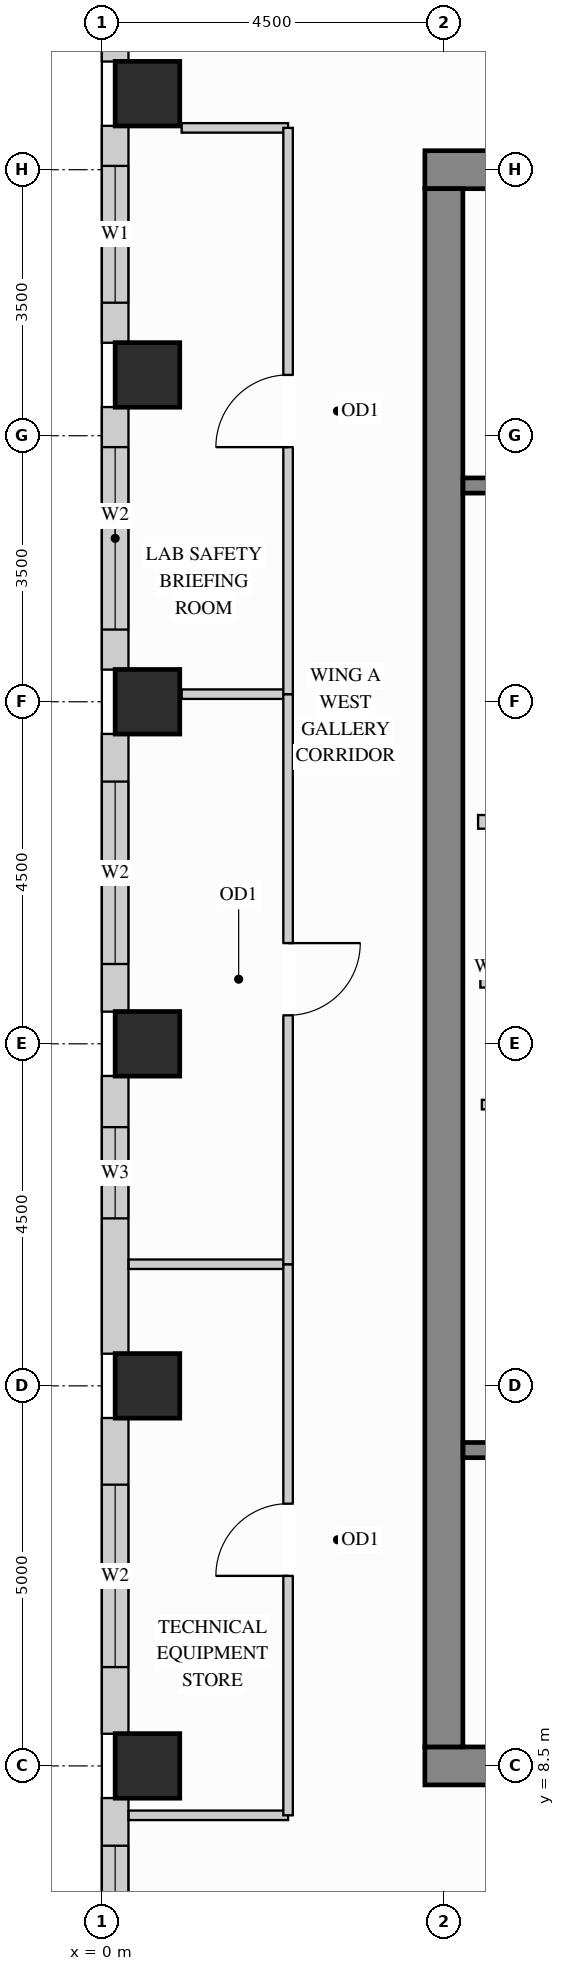
"""IFC4 building model, lengths in metres.
Left out: names, types, materials, properties, quantities, classifications, styles, units other than length and angle.
Written with IfcOpenShell. Run it as: python <this file> out.ifc"""

import sys

from ifc_helpers import new_model, si_unit, direction, frame, frame_2d, origin, origin_2d, place, context, subcontext, project, spatial, rectangle, extrude, source, transform, mapped, element, fill, save


model = new_model("IFC4")
c1 = context("Model", 3, precision=1e-05, world=origin(), true_north=direction((0.0, 1.0)))
c2 = subcontext(c1, "Body", "Model", "MODEL_VIEW")
j1 = project(units=[si_unit("LENGTHUNIT", "METRE"), si_unit("PLANEANGLEUNIT", "RADIAN")], contexts=[c1])
p1 = place(None, origin())
s1 = spatial("IfcSite", under=j1, at=p1, CompositionType="ELEMENT")
p2 = place(p1, origin())
s2 = spatial("IfcBuilding", under=s1, at=p2, CompositionType="ELEMENT")
p3 = place(p2, frame((0.0, 0.0, 230.4)))
s3 = spatial("IfcBuildingStorey", under=s2, at=p3, CompositionType="ELEMENT", Elevation=230.4)
m1 = source(origin(), c2, "Body", "SweptSolid", [
    extrude(rectangle(XDim=0.85, YDim=0.85, at=origin_2d()), origin(), (0.0, 0.0, 1.0), 3.4),
])
for number, where, z_axis, x_axis in (
    (1, (0.6, 13.5, 0.0), (0.0, 0.0, 1.0), (1.0, 0.0, 0.0)),
    (2, (0.6, 18.0, 0.0), (0.0, 0.0, 1.0), (1.0, 0.0, 0.0)),
    (3, (0.6, 22.5, 0.0), (0.0, 0.0, 1.0), (1.0, 0.0, 0.0)),
    (4, (0.6, 26.8, 0.0), (0.0, 0.0, 1.0), (1.0, 0.0, 0.0)),
    (5, (0.6, 30.5, 0.0), (0.0, 0.0, 1.0), (1.0, 0.0, 0.0)),
    (6, (0.6, 8.5, 0.0), (0.0, 0.0, 1.0), (1.0, 0.0, 0.0)),
):
    element("IfcColumn", number, at=place(p3, frame(where, z_axis=z_axis, x_axis=x_axis)), inside=s3, PredefinedType="COLUMN", context=c2, shape_type="MappedRepresentation", body=[
        mapped(m1, transform((0.0, 0.0, 0.0), x_axis=(1.0, 0.0, 0.0), y_axis=(0.0, 1.0, 0.0), z_axis=(0.0, 0.0, 1.0))),
    ])
m2 = source(origin(), c2, "Body", "SweptSolid", [
    extrude(rectangle(XDim=10.5, YDim=0.5, at=frame_2d((5.25, 0.0))), origin(), (0.0, 0.0, 1.0), 3.4),
])
for number, where, z_axis, x_axis in (
    (7, (4.25, 29.5, 0.0), (0.0, 0.0, 1.0), (1.0, 0.0, 0.0)),
    (8, (4.25, 8.5, 0.0), (0.0, 0.0, 1.0), (1.0, 0.0, 0.0)),
):
    element("IfcWall", number, at=place(p3, frame(where, z_axis=z_axis, x_axis=x_axis)), inside=s3, PredefinedType="SHEAR", context=c2, shape_type="MappedRepresentation", body=[
        mapped(m2, transform((0.0, 0.0, 0.0), x_axis=(1.0, 0.0, 0.0), y_axis=(0.0, 1.0, 0.0), z_axis=(0.0, 0.0, 1.0))),
    ])
m3 = source(origin(), c2, "Body", "SweptSolid", [
    extrude(rectangle(XDim=20.5, YDim=0.5, at=frame_2d((10.25, 0.0))), origin(), (0.0, 0.0, 1.0), 3.4),
])
p4 = place(p3, frame((4.5, 8.75, 0.0), z_axis=(0.0, 0.0, 1.0), x_axis=(0.0, 1.0, 0.0)))
e9 = element("IfcWall", 9, at=p4, inside=s3, PredefinedType="SHEAR", context=c2, shape_type="MappedRepresentation", body=[
    mapped(m3, transform((0.0, 0.0, 0.0), x_axis=(1.0, 0.0, 0.0), y_axis=(0.0, 1.0, 0.0), z_axis=(0.0, 0.0, 1.0))),
])
p5 = place(p3, frame((0.175, 34.577, 0.0), z_axis=(0.0, 0.0, 1.0), x_axis=(0.0, -1.0, 0.0)))
e10 = element("IfcWall", 10, at=p5, inside=s3, PredefinedType="SOLIDWALL", context=c2, shape_type="SweptSolid", body=[
    extrude(rectangle(XDim=3.654, YDim=0.35, at=frame_2d((1.827, 0.0))), origin(), (0.0, 0.0, 1.0), 3.385),
])
p6 = place(p5, frame((2.055, 0.0, 0.78)))
e11 = element("IfcOpeningElement", 11, at=p6, cuts=e10, PredefinedType="OPENING", context=c2, shape_type="SweptSolid", body=[
    extrude(rectangle(XDim=1.2, YDim=2.1, at=frame_2d((0.6, 1.05))), frame((0.0, 0.185, 0.0), z_axis=(0.0, -1.0, 0.0), x_axis=(1.0, 0.0, 0.0)), (0.0, 0.0, 1.0), 0.37),
])
p7 = place(p3, frame((0.175, 30.077, 0.0), z_axis=(0.0, 0.0, 1.0), x_axis=(0.0, -1.0, 0.0)))
e12 = element("IfcWall", 12, at=p7, inside=s3, PredefinedType="SOLIDWALL", context=c2, shape_type="SweptSolid", body=[
    extrude(rectangle(XDim=2.854, YDim=0.35, at=frame_2d((1.427, 0.0))), origin(), (0.0, 0.0, 1.0), 3.385),
])
p8 = place(p7, frame((0.527, 0.0, 0.78)))
e13 = element("IfcOpeningElement", 13, at=p8, cuts=e12, PredefinedType="OPENING", context=c2, shape_type="SweptSolid", body=[
    extrude(rectangle(XDim=1.8, YDim=2.1, at=frame_2d((0.9, 1.05))), frame((0.0, 0.185, 0.0), z_axis=(0.0, -1.0, 0.0), x_axis=(1.0, 0.0, 0.0)), (0.0, 0.0, 1.0), 0.37),
])
p9 = place(p3, frame((0.175, 26.377, 0.0), z_axis=(0.0, 0.0, 1.0), x_axis=(0.0, -1.0, 0.0)))
e14 = element("IfcWall", 14, at=p9, inside=s3, PredefinedType="SOLIDWALL", context=c2, shape_type="SweptSolid", body=[
    extrude(rectangle(XDim=3.454, YDim=0.35, at=frame_2d((1.727, 0.0))), origin(), (0.0, 0.0, 1.0), 3.385),
])
p10 = place(p9, frame((0.527, 0.0, 0.78)))
e15 = element("IfcOpeningElement", 15, at=p10, cuts=e14, PredefinedType="OPENING", context=c2, shape_type="SweptSolid", body=[
    extrude(rectangle(XDim=2.4, YDim=2.1, at=frame_2d((1.2, 1.05))), frame((0.0, 0.185, 0.0), z_axis=(0.0, -1.0, 0.0), x_axis=(1.0, 0.0, 0.0)), (0.0, 0.0, 1.0), 0.37),
])
p11 = place(p3, frame((0.175, 22.077, 0.0), z_axis=(0.0, 0.0, 1.0), x_axis=(0.0, -1.0, 0.0)))
e16 = element("IfcWall", 16, at=p11, inside=s3, PredefinedType="SOLIDWALL", context=c2, shape_type="SweptSolid", body=[
    extrude(rectangle(XDim=3.654, YDim=0.35, at=frame_2d((1.827, 0.0))), origin(), (0.0, 0.0, 1.0), 3.385),
])
p12 = place(p11, frame((0.627, 0.0, 0.78)))
e17 = element("IfcOpeningElement", 17, at=p12, cuts=e16, PredefinedType="OPENING", context=c2, shape_type="SweptSolid", body=[
    extrude(rectangle(XDim=2.4, YDim=2.1, at=frame_2d((1.2, 1.05))), frame((0.0, 0.185, 0.0), z_axis=(0.0, -1.0, 0.0), x_axis=(1.0, 0.0, 0.0)), (0.0, 0.0, 1.0), 0.37),
])
p13 = place(p3, frame((0.175, 17.577, 0.0), z_axis=(0.0, 0.0, 1.0), x_axis=(0.0, -1.0, 0.0)))
e18 = element("IfcWall", 18, at=p13, inside=s3, PredefinedType="SOLIDWALL", context=c2, shape_type="SweptSolid", body=[
    extrude(rectangle(XDim=3.654, YDim=0.35, at=frame_2d((1.827, 0.0))), origin(), (0.0, 0.0, 1.0), 3.385),
])
p14 = place(p13, frame((0.674, 0.0, 0.78)))
e19 = element("IfcOpeningElement", 19, at=p14, cuts=e18, PredefinedType="OPENING", context=c2, shape_type="SweptSolid", body=[
    extrude(rectangle(XDim=1.2, YDim=2.1, at=frame_2d((0.6, 1.05))), frame((0.0, 0.185, 0.0), z_axis=(0.0, -1.0, 0.0), x_axis=(1.0, 0.0, 0.0)), (0.0, 0.0, 1.0), 0.37),
])
p15 = place(p3, frame((0.175, 13.077, 0.0), z_axis=(0.0, 0.0, 1.0), x_axis=(0.0, -1.0, 0.0)))
e20 = element("IfcWall", 20, at=p15, inside=s3, PredefinedType="SOLIDWALL", context=c2, shape_type="SweptSolid", body=[
    extrude(rectangle(XDim=4.154, YDim=0.35, at=frame_2d((2.077, 0.0))), origin(), (0.0, 0.0, 1.0), 3.385),
])
p16 = place(p15, frame((0.877, 0.0, 0.78)))
e21 = element("IfcOpeningElement", 21, at=p16, cuts=e20, PredefinedType="OPENING", context=c2, shape_type="SweptSolid", body=[
    extrude(rectangle(XDim=2.4, YDim=2.1, at=frame_2d((1.2, 1.05))), frame((0.0, 0.185, 0.0), z_axis=(0.0, -1.0, 0.0), x_axis=(1.0, 0.0, 0.0)), (0.0, 0.0, 1.0), 0.37),
])
p17 = place(p3, frame((0.175, 8.077, 0.0), z_axis=(0.0, 0.0, 1.0), x_axis=(0.0, -1.0, 0.0)))
e22 = element("IfcWall", 22, at=p17, inside=s3, PredefinedType="SOLIDWALL", context=c2, shape_type="SweptSolid", body=[
    extrude(rectangle(XDim=4.154, YDim=0.35, at=frame_2d((2.077, 0.0))), origin(), (0.0, 0.0, 1.0), 3.385),
])
p18 = place(p17, frame((0.627, 0.0, 0.78)))
e23 = element("IfcOpeningElement", 23, at=p18, cuts=e22, PredefinedType="OPENING", context=c2, shape_type="SweptSolid", body=[
    extrude(rectangle(XDim=2.4, YDim=2.1, at=frame_2d((1.2, 1.05))), frame((0.0, 0.185, 0.0), z_axis=(0.0, -1.0, 0.0), x_axis=(1.0, 0.0, 0.0)), (0.0, 0.0, 1.0), 0.37),
])
m4 = source(origin(), c2, "Body", "SweptSolid", [
    extrude(rectangle(XDim=2.2, YDim=0.18, at=frame_2d((1.1, 0.0))), origin(), (0.0, 0.0, 1.0), 3.385),
])
p19 = place(p3, frame((4.95, 20.92, 0.0), z_axis=(0.0, 0.0, 1.0), x_axis=(1.0, 0.0, 0.0)))
e24 = element("IfcWall", 24, at=p19, inside=s3, PredefinedType="PARTITIONING", context=c2, shape_type="MappedRepresentation", body=[
    mapped(m4, transform((0.0, 0.0, 0.0), x_axis=(1.0, 0.0, 0.0), y_axis=(0.0, 1.0, 0.0), z_axis=(0.0, 0.0, 1.0))),
])
p20 = place(p3, frame((5.0, 17.2, 0.0), z_axis=(0.0, 0.0, 1.0), x_axis=(1.0, 0.0, 0.0)))
e25 = element("IfcWall", 25, at=p20, inside=s3, PredefinedType="PARTITIONING", context=c2, shape_type="SweptSolid", body=[
    extrude(rectangle(XDim=2.4, YDim=0.125, at=frame_2d((1.2, 0.0))), origin(), (0.0, 0.0, 1.0), 3.385),
])
p21 = place(p20, frame((0.7, 0.0, 0.0)))
e26 = element("IfcOpeningElement", 26, at=p21, cuts=e25, PredefinedType="OPENING", context=c2, shape_type="SweptSolid", body=[
    extrude(rectangle(XDim=0.85, YDim=2.1, at=frame_2d((0.425, 1.05))), frame((0.0, 0.073, 0.0), z_axis=(0.0, -1.0, 0.0), x_axis=(1.0, 0.0, 0.0)), (0.0, 0.0, 1.0), 0.145),
])
m5 = source(origin(), c2, "Body", "SweptSolid", [
    extrude(rectangle(XDim=1.4, YDim=0.125, at=frame_2d((0.7, 0.0))), origin(), (0.0, 0.0, 1.0), 3.385),
])
p22 = place(p3, frame((1.05, 30.05, 0.0), z_axis=(0.0, 0.0, 1.0), x_axis=(1.0, 0.0, 0.0)))
e27 = element("IfcWall", 27, at=p22, inside=s3, PredefinedType="PARTITIONING", context=c2, shape_type="MappedRepresentation", body=[
    mapped(m5, transform((0.0, 0.0, 0.0), x_axis=(1.0, 0.0, 0.0), y_axis=(0.0, 1.0, 0.0), z_axis=(0.0, 0.0, 1.0))),
])
m6 = source(origin(), c2, "Body", "SweptSolid", [
    extrude(rectangle(XDim=2.098, YDim=0.125, at=frame_2d((1.049, 0.0))), origin(), (0.0, 0.0, 1.0), 3.385),
])
for number, where, z_axis, x_axis in (
    (28, (0.352, 7.85, 0.0), (0.0, 0.0, 1.0), (1.0, 0.0, 0.0)),
    (29, (0.352, 15.1, 0.0), (0.0, 0.0, 1.0), (1.0, 0.0, 0.0)),
):
    element("IfcWall", number, at=place(p3, frame(where, z_axis=z_axis, x_axis=x_axis)), inside=s3, PredefinedType="PARTITIONING", context=c2, shape_type="MappedRepresentation", body=[
        mapped(m6, transform((0.0, 0.0, 0.0), x_axis=(1.0, 0.0, 0.0), y_axis=(0.0, 1.0, 0.0), z_axis=(0.0, 0.0, 1.0))),
    ])
p23 = place(p3, frame((1.05, 22.6, 0.0), z_axis=(0.0, 0.0, 1.0), x_axis=(1.0, 0.0, 0.0)))
e30 = element("IfcWall", 30, at=p23, inside=s3, PredefinedType="PARTITIONING", context=c2, shape_type="MappedRepresentation", body=[
    mapped(m5, transform((0.0, 0.0, 0.0), x_axis=(1.0, 0.0, 0.0), y_axis=(0.0, 1.0, 0.0), z_axis=(0.0, 0.0, 1.0))),
])
p24 = place(p3, frame((2.45, 7.85, 0.0), z_axis=(0.0, 0.0, 1.0), x_axis=(0.0, 1.0, 0.0)))
e31 = element("IfcWall", 31, at=p24, inside=s3, PredefinedType="PARTITIONING", context=c2, shape_type="SweptSolid", body=[
    extrude(rectangle(XDim=7.25, YDim=0.125, at=frame_2d((3.625, 0.0))), origin(), (0.0, 0.0, 1.0), 3.385),
])
p25 = place(p24, frame((3.15, 0.0, 0.0)))
e32 = element("IfcOpeningElement", 32, at=p25, cuts=e31, PredefinedType="OPENING", context=c2, shape_type="SweptSolid", body=[
    extrude(rectangle(XDim=0.95, YDim=2.15, at=frame_2d((0.475, 1.075))), frame((0.0, 0.073, 0.0), z_axis=(0.0, -1.0, 0.0), x_axis=(1.0, 0.0, 0.0)), (0.0, 0.0, 1.0), 0.145),
])
p26 = place(p3, frame((2.45, 15.1, 0.0), z_axis=(0.0, 0.0, 1.0), x_axis=(0.0, 1.0, 0.0)))
e33 = element("IfcWall", 33, at=p26, inside=s3, PredefinedType="PARTITIONING", context=c2, shape_type="SweptSolid", body=[
    extrude(rectangle(XDim=7.5, YDim=0.125, at=frame_2d((3.75, 0.0))), origin(), (0.0, 0.0, 1.0), 3.385),
])
p27 = place(p26, frame((3.275, 0.0, 0.0)))
e34 = element("IfcOpeningElement", 34, at=p27, cuts=e33, PredefinedType="OPENING", context=c2, shape_type="SweptSolid", body=[
    extrude(rectangle(XDim=0.95, YDim=2.15, at=frame_2d((0.475, 1.075))), frame((0.0, 0.073, 0.0), z_axis=(0.0, -1.0, 0.0), x_axis=(1.0, 0.0, 0.0)), (0.0, 0.0, 1.0), 0.145),
])
p28 = place(p3, frame((2.45, 22.6, 0.0), z_axis=(0.0, 0.0, 1.0), x_axis=(0.0, 1.0, 0.0)))
e35 = element("IfcWall", 35, at=p28, inside=s3, PredefinedType="PARTITIONING", context=c2, shape_type="SweptSolid", body=[
    extrude(rectangle(XDim=7.45, YDim=0.125, at=frame_2d((3.725, 0.0))), origin(), (0.0, 0.0, 1.0), 3.385),
])
p29 = place(p28, frame((3.25, 0.0, 0.0)))
e36 = element("IfcOpeningElement", 36, at=p29, cuts=e35, PredefinedType="OPENING", context=c2, shape_type="SweptSolid", body=[
    extrude(rectangle(XDim=0.95, YDim=2.15, at=frame_2d((0.475, 1.075))), frame((0.0, 0.073, 0.0), z_axis=(0.0, -1.0, 0.0), x_axis=(1.0, 0.0, 0.0)), (0.0, 0.0, 1.0), 0.145),
])
m7 = source(origin(), c2, "Body", "SweptSolid", [
    extrude(rectangle(XDim=2.09, YDim=0.2, at=frame_2d((1.045, 0.0))), origin(), (0.0, 0.0, 1.0), 3.385),
])
p30 = place(p3, frame((4.98, 18.84, 0.0), z_axis=(0.0, 0.0, 1.0), x_axis=(1.0, 0.0, 0.0)))
e37 = element("IfcWall", 37, at=p30, inside=s3, PredefinedType="PARTITIONING", context=c2, shape_type="MappedRepresentation", body=[
    mapped(m7, transform((0.0, 0.0, 0.0), x_axis=(1.0, 0.0, 0.0), y_axis=(0.0, 1.0, 0.0), z_axis=(0.0, 0.0, 1.0))),
])
p31 = place(p3, frame((4.752, 12.655, 0.0), z_axis=(0.0, 0.0, 1.0), x_axis=(1.0, 0.0, 0.0)))
e38 = element("IfcWall", 38, at=p31, inside=s3, PredefinedType="SHEAR", context=c2, shape_type="SweptSolid", body=[
    extrude(rectangle(XDim=7.653, YDim=0.2, at=frame_2d((3.827, 0.0))), origin(), (0.0, 0.0, 1.0), 3.4),
])
p32 = place(p31, frame((0.4, 0.0, 0.0)))
e39 = element("IfcOpeningElement", 39, at=p32, cuts=e38, PredefinedType="OPENING", context=c2, shape_type="SweptSolid", body=[
    extrude(rectangle(XDim=1.1, YDim=2.15, at=frame_2d((0.55, 1.075))), frame((0.0, 0.11, 0.0), z_axis=(0.0, -1.0, 0.0), x_axis=(1.0, 0.0, 0.0)), (0.0, 0.0, 1.0), 0.22),
])
p33 = place(p3, frame((4.752, 25.345, 0.0), z_axis=(0.0, 0.0, 1.0), x_axis=(1.0, 0.0, 0.0)))
e40 = element("IfcWall", 40, at=p33, inside=s3, PredefinedType="SHEAR", context=c2, shape_type="SweptSolid", body=[
    extrude(rectangle(XDim=7.653, YDim=0.2, at=frame_2d((3.827, 0.0))), origin(), (0.0, 0.0, 1.0), 3.4),
])
p34 = place(p33, frame((0.4, 0.0, 0.0)))
e41 = element("IfcOpeningElement", 41, at=p34, cuts=e40, PredefinedType="OPENING", context=c2, shape_type="SweptSolid", body=[
    extrude(rectangle(XDim=1.1, YDim=2.15, at=frame_2d((0.55, 1.075))), frame((0.0, 0.11, 0.0), z_axis=(0.0, -1.0, 0.0), x_axis=(1.0, 0.0, 0.0)), (0.0, 0.0, 1.0), 0.22),
])
m8 = source(origin(), c2, "Body", "SweptSolid", [
    extrude(rectangle(XDim=0.95, YDim=2.15, at=frame_2d((0.475, 1.075))), frame((0.0, 0.025, 0.0), z_axis=(0.0, -1.0, 0.0), x_axis=(1.0, 0.0, 0.0)), (0.0, 0.0, 1.0), 0.05),
])
p35 = place(p25, origin())
e42 = element("IfcDoor", 42, at=p35, inside=s3, OperationType="SINGLE_SWING_LEFT", PredefinedType="DOOR", context=c2, shape_type="MappedRepresentation", body=[
    mapped(m8, transform((0.0, 0.0, 0.0), x_axis=(1.0, 0.0, 0.0), y_axis=(0.0, 1.0, 0.0), z_axis=(0.0, 0.0, 1.0))),
])
fill(e32, e42)
p36 = place(p27, origin())
e43 = element("IfcDoor", 43, at=p36, inside=s3, OperationType="SINGLE_SWING_RIGHT", PredefinedType="DOOR", context=c2, shape_type="MappedRepresentation", body=[
    mapped(m8, transform((0.0, 0.0, 0.0), x_axis=(1.0, 0.0, 0.0), y_axis=(0.0, 1.0, 0.0), z_axis=(0.0, 0.0, 1.0))),
])
fill(e34, e43)
p37 = place(p29, origin())
e44 = element("IfcDoor", 44, at=p37, inside=s3, OperationType="SINGLE_SWING_LEFT", PredefinedType="DOOR", context=c2, shape_type="MappedRepresentation", body=[
    mapped(m8, transform((0.0, 0.0, 0.0), x_axis=(1.0, 0.0, 0.0), y_axis=(0.0, 1.0, 0.0), z_axis=(0.0, 0.0, 1.0))),
])
fill(e36, e44)
m9 = source(origin(), c2, "Body", "SweptSolid", [
    extrude(rectangle(XDim=1.8, YDim=2.1, at=frame_2d((0.9, 1.05))), frame((0.0, 0.03, 0.0), z_axis=(0.0, -1.0, 0.0), x_axis=(1.0, 0.0, 0.0)), (0.0, 0.0, 1.0), 0.06),
])
p38 = place(p8, origin())
e45 = element("IfcWindow", 45, at=p38, inside=s3, PartitioningType="SINGLE_PANEL", PredefinedType="WINDOW", context=c2, shape_type="MappedRepresentation", body=[
    mapped(m9, transform((0.0, 0.0, 0.0), x_axis=(1.0, 0.0, 0.0), y_axis=(0.0, 1.0, 0.0), z_axis=(0.0, 0.0, 1.0))),
])
fill(e13, e45)
m10 = source(origin(), c2, "Body", "SweptSolid", [
    extrude(rectangle(XDim=2.4, YDim=2.1, at=frame_2d((1.2, 1.05))), frame((0.0, 0.03, 0.0), z_axis=(0.0, -1.0, 0.0), x_axis=(1.0, 0.0, 0.0)), (0.0, 0.0, 1.0), 0.06),
])
p39 = place(p10, origin())
e46 = element("IfcWindow", 46, at=p39, inside=s3, PartitioningType="SINGLE_PANEL", PredefinedType="WINDOW", context=c2, shape_type="MappedRepresentation", body=[
    mapped(m10, transform((0.0, 0.0, 0.0), x_axis=(1.0, 0.0, 0.0), y_axis=(0.0, 1.0, 0.0), z_axis=(0.0, 0.0, 1.0))),
])
fill(e15, e46)
p40 = place(p12, origin())
e47 = element("IfcWindow", 47, at=p40, inside=s3, PartitioningType="SINGLE_PANEL", PredefinedType="WINDOW", context=c2, shape_type="MappedRepresentation", body=[
    mapped(m10, transform((0.0, 0.0, 0.0), x_axis=(1.0, 0.0, 0.0), y_axis=(0.0, 1.0, 0.0), z_axis=(0.0, 0.0, 1.0))),
])
fill(e17, e47)
p41 = place(p16, origin())
e48 = element("IfcWindow", 48, at=p41, inside=s3, PartitioningType="SINGLE_PANEL", PredefinedType="WINDOW", context=c2, shape_type="MappedRepresentation", body=[
    mapped(m10, transform((0.0, 0.0, 0.0), x_axis=(1.0, 0.0, 0.0), y_axis=(0.0, 1.0, 0.0), z_axis=(0.0, 0.0, 1.0))),
])
fill(e21, e48)
p42 = place(p18, origin())
e49 = element("IfcWindow", 49, at=p42, inside=s3, PartitioningType="SINGLE_PANEL", PredefinedType="WINDOW", context=c2, shape_type="MappedRepresentation", body=[
    mapped(m10, transform((0.0, 0.0, 0.0), x_axis=(1.0, 0.0, 0.0), y_axis=(0.0, 1.0, 0.0), z_axis=(0.0, 0.0, 1.0))),
])
fill(e23, e49)
m11 = source(origin(), c2, "Body", "SweptSolid", [
    extrude(rectangle(XDim=1.2, YDim=2.1, at=frame_2d((0.6, 1.05))), frame((0.0, 0.03, 0.0), z_axis=(0.0, -1.0, 0.0), x_axis=(1.0, 0.0, 0.0)), (0.0, 0.0, 1.0), 0.06),
])
p43 = place(p14, origin())
e50 = element("IfcWindow", 50, at=p43, inside=s3, PartitioningType="SINGLE_PANEL", PredefinedType="WINDOW", context=c2, shape_type="MappedRepresentation", body=[
    mapped(m11, transform((0.0, 0.0, 0.0), x_axis=(1.0, 0.0, 0.0), y_axis=(0.0, 1.0, 0.0), z_axis=(0.0, 0.0, 1.0))),
])
fill(e19, e50)
save(model, sys.argv[1])
